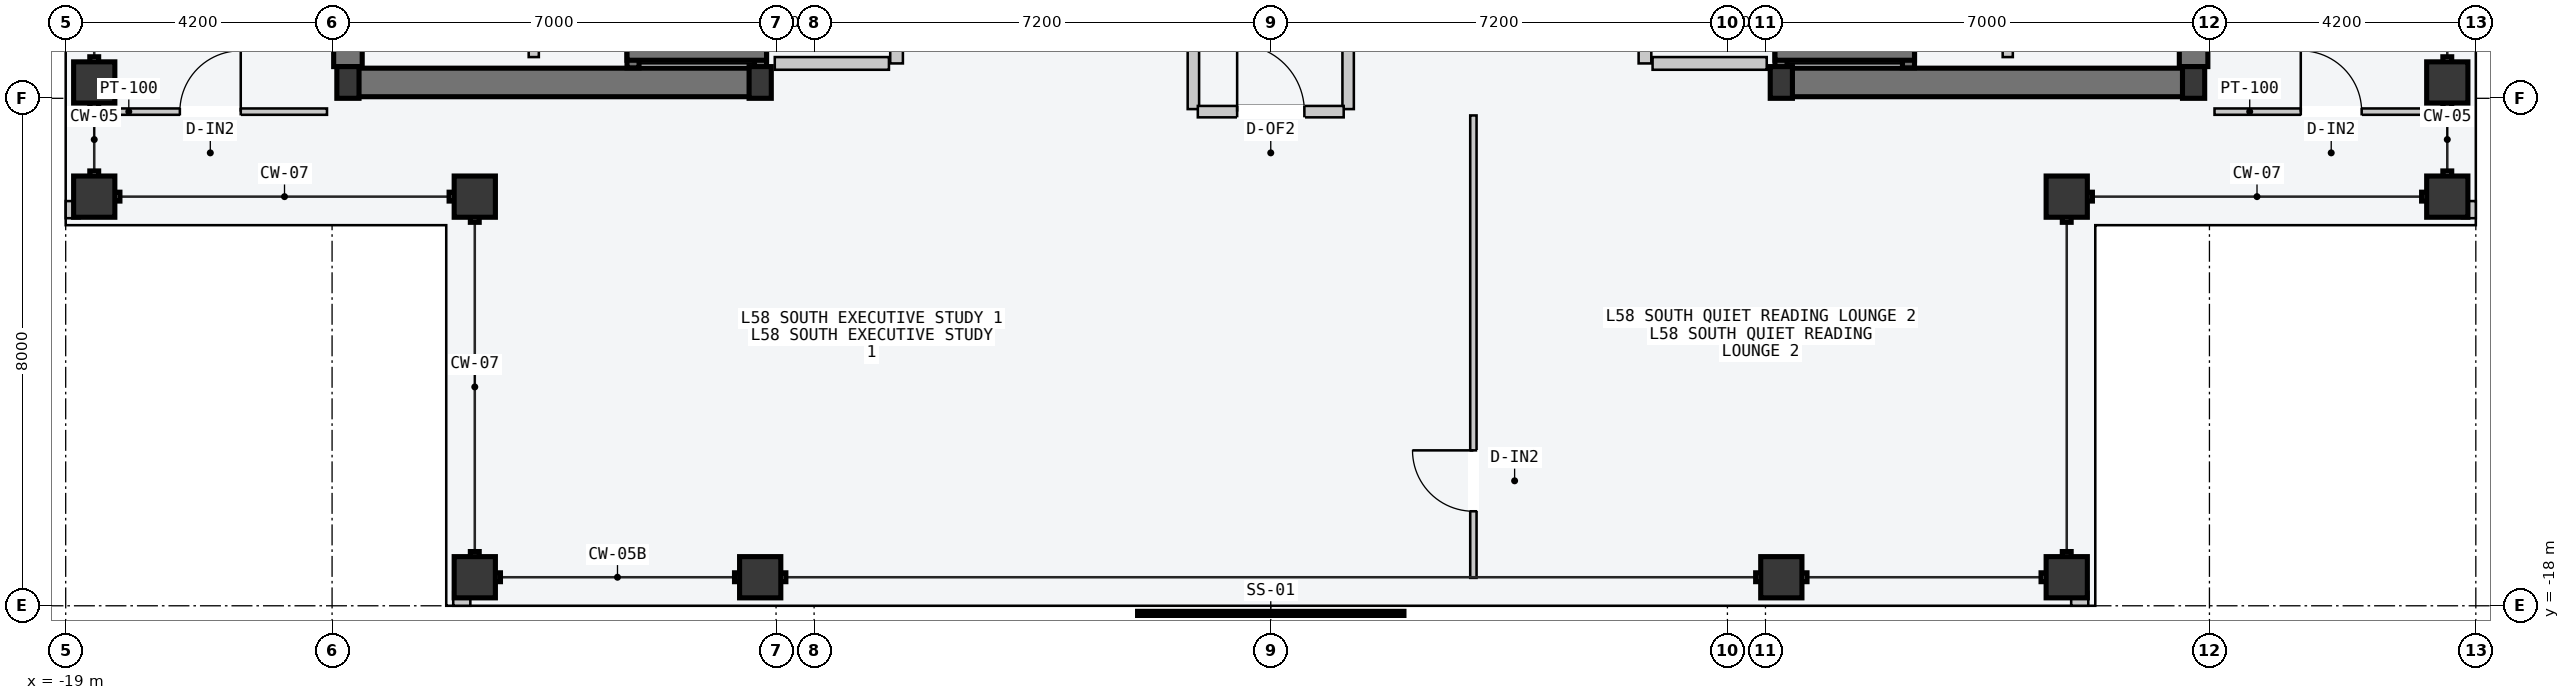
"""IFC4 building model, lengths in metres.
Left out: names, types, materials, properties, quantities, classifications, styles, units other than length and angle.
Written with IfcOpenShell. Run it as: python <this file> out.ifc"""

import sys

from ifc_helpers import new_model, si_unit, direction, frame, frame_2d, origin, origin_2d, place, context, subcontext, project, spatial, rectangle, hollow_rectangle, i_section, extrude, element, fill, save


model = new_model("IFC4")
c1 = context("Model", 3, precision=1e-05, world=origin(), true_north=direction((0.0, 1.0)))
c2 = subcontext(c1, "Body", "Model", "MODEL_VIEW")
j1 = project(units=[si_unit("LENGTHUNIT", "METRE"), si_unit("PLANEANGLEUNIT", "RADIAN")], contexts=[c1])
p1 = place(None, origin())
s1 = spatial("IfcSite", under=j1, at=p1, CompositionType="ELEMENT")
p2 = place(p1, origin())
s2 = spatial("IfcBuilding", under=s1, at=p2, CompositionType="ELEMENT")
p3 = place(p2, frame((0.0, 0.0, 222.0)))
s3 = spatial("IfcBuildingStorey", under=s2, at=p3, CompositionType="ELEMENT", Elevation=222.0)
p4 = place(p3, frame((-14.53, -9.75, -0.2), z_axis=(0.0, 0.0, 1.0), x_axis=(1.0, 0.0, 0.0)))
e1 = element("IfcWall", 1, at=p4, inside=s3, PredefinedType="SHEAR", context=c2, shape_type="SweptSolid", body=[
    extrude(rectangle(XDim=6.46, YDim=0.45, at=frame_2d((3.23, 0.0))), origin(), (0.0, 0.0, 1.0), 3.6),
])
p5 = place(p3, frame((-14.55, -9.5, -0.2), z_axis=(0.0, 0.0, 1.0), x_axis=(0.0, 1.0, 0.0)))
e2 = element("IfcWall", 2, at=p5, inside=s3, PredefinedType="SHEAR", context=c2, shape_type="SweptSolid", body=[
    extrude(rectangle(XDim=9.25, YDim=0.45, at=frame_2d((4.625, 0.0))), origin(), (0.0, 0.0, 1.0), 3.6),
])
p6 = place(p3, frame((8.07, -9.75, -0.2), z_axis=(0.0, 0.0, 1.0), x_axis=(1.0, 0.0, 0.0)))
e3 = element("IfcWall", 3, at=p6, inside=s3, PredefinedType="SHEAR", context=c2, shape_type="SweptSolid", body=[
    extrude(rectangle(XDim=6.46, YDim=0.45, at=frame_2d((3.23, 0.0))), origin(), (0.0, 0.0, 1.0), 3.6),
])
p7 = place(p3, frame((14.55, -9.5, -0.2), z_axis=(0.0, 0.0, 1.0), x_axis=(0.0, 1.0, 0.0)))
e4 = element("IfcWall", 4, at=p7, inside=s3, PredefinedType="SHEAR", context=c2, shape_type="SweptSolid", body=[
    extrude(rectangle(XDim=9.25, YDim=0.45, at=frame_2d((4.625, 0.0))), origin(), (0.0, 0.0, 1.0), 3.6),
])
for number, where, z_axis, x_axis in (
    (5, (-14.55, -9.75, 0.0), (0.0, 0.0, 1.0), (1.0, 0.0, 0.0)),
    (6, (-8.05, -9.75, 0.0), (0.0, 0.0, 1.0), (1.0, 0.0, 0.0)),
    (7, (8.05, -9.75, 0.0), (0.0, 0.0, 1.0), (1.0, 0.0, 0.0)),
    (8, (14.55, -9.75, 0.0), (0.0, 0.0, 1.0), (1.0, 0.0, 0.0)),
):
    element("IfcColumn", number, at=place(p3, frame(where, z_axis=z_axis, x_axis=x_axis)), inside=s3, PredefinedType="COLUMN", context=c2, shape_type="SweptSolid", body=[
        extrude(i_section(OverallWidth=0.35, OverallDepth=0.5, WebThickness=0.02, FlangeThickness=0.032, at=origin_2d()), origin(), (0.0, 0.0, 1.0), 3.6),
    ])
for number, where, z_axis, x_axis in (
    (9, (-12.55, -17.55, 0.0), (0.0, 0.0, 1.0), (1.0, 0.0, 0.0)),
    (10, (-8.05, -17.55, 0.0), (0.0, 0.0, 1.0), (1.0, 0.0, 0.0)),
    (11, (8.05, -17.55, 0.0), (0.0, 0.0, 1.0), (1.0, 0.0, 0.0)),
    (12, (12.55, -17.55, 0.0), (0.0, 0.0, 1.0), (1.0, 0.0, 0.0)),
    (13, (-18.55, -11.55, 0.0), (0.0, 0.0, 1.0), (0.0, 1.0, 0.0)),
    (14, (-18.55, -9.75, 0.0), (0.0, 0.0, 1.0), (0.0, 1.0, 0.0)),
    (15, (18.55, -11.55, 0.0), (0.0, 0.0, 1.0), (0.0, 1.0, 0.0)),
    (16, (18.55, -9.75, 0.0), (0.0, 0.0, 1.0), (0.0, 1.0, 0.0)),
    (17, (12.55, -11.55, 0.0), (0.0, 0.0, 1.0), (1.0, 0.0, 0.0)),
    (18, (-12.55, -11.55, 0.0), (0.0, 0.0, 1.0), (1.0, 0.0, 0.0)),
):
    element("IfcColumn", number, at=place(p3, frame(where, z_axis=z_axis, x_axis=x_axis)), inside=s3, PredefinedType="COLUMN", context=c2, shape_type="SweptSolid", body=[
        extrude(hollow_rectangle(XDim=0.65, YDim=0.65, WallThickness=0.028, at=origin_2d()), origin(), (0.0, 0.0, 1.0), 3.6),
    ])
for number, where, z_axis, x_axis in (
    (19, (-12.89, -17.89, 0.0), (0.0, 0.0, 1.0), (1.0, 0.0, 0.0)),
    (20, (-18.89, -11.89, 0.0), (0.0, 0.0, 1.0), (0.0, 1.0, 0.0)),
    (21, (12.62, -17.89, 0.0), (0.0, 0.0, 1.0), (1.0, 0.0, 0.0)),
    (22, (18.89, -11.89, 0.0), (0.0, 0.0, 1.0), (0.0, 1.0, 0.0)),
):
    element("IfcWall", number, at=place(p3, frame(where, z_axis=z_axis, x_axis=x_axis)), inside=s3, PredefinedType="PARAPET", context=c2, shape_type="SweptSolid", body=[
        extrude(rectangle(XDim=0.27, YDim=0.22, at=frame_2d((0.135, 0.0))), origin(), (0.0, 0.0, 1.0), 1.2),
    ])
p8 = place(p3, frame((-8.045, -9.52, -0.2), z_axis=(0.0, 0.0, 1.0), x_axis=(0.0, 1.0, 0.0)))
e23 = element("IfcWall", 23, at=p8, inside=s3, PredefinedType="SOLIDWALL", context=c2, shape_type="SweptSolid", body=[
    extrude(rectangle(XDim=2.12, YDim=0.19, at=frame_2d((1.06, 0.0))), origin(), (0.0, 0.0, 1.0), 3.6),
])
p9 = place(p8, frame((0.57, 0.0, 0.2)))
e24 = element("IfcOpeningElement", 24, at=p9, cuts=e23, PredefinedType="OPENING", context=c2, shape_type="SweptSolid", body=[
    extrude(rectangle(XDim=1.1, YDim=2.2, at=frame_2d((0.55, 1.1))), frame((0.0, 0.105, 0.0), z_axis=(0.0, -1.0, 0.0), x_axis=(1.0, 0.0, 0.0)), (0.0, 0.0, 1.0), 0.21),
])
p10 = place(p3, frame((-10.055, -9.52, -0.2), z_axis=(0.0, 0.0, 1.0), x_axis=(0.0, 1.0, 0.0)))
e25 = element("IfcWall", 25, at=p10, inside=s3, PredefinedType="SOLIDWALL", context=c2, shape_type="SweptSolid", body=[
    extrude(rectangle(XDim=2.12, YDim=0.19, at=frame_2d((1.06, 0.0))), origin(), (0.0, 0.0, 1.0), 3.6),
])
p11 = place(p3, frame((-10.15, -9.305, -0.2), z_axis=(0.0, 0.0, 1.0), x_axis=(1.0, 0.0, 0.0)))
e26 = element("IfcWall", 26, at=p11, inside=s3, PredefinedType="SOLIDWALL", context=c2, shape_type="SweptSolid", body=[
    extrude(rectangle(XDim=2.2, YDim=0.19, at=frame_2d((1.1, 0.0))), origin(), (0.0, 0.0, 1.0), 3.6),
])
p12 = place(p3, frame((8.045, -9.52, -0.2), z_axis=(0.0, 0.0, 1.0), x_axis=(0.0, 1.0, 0.0)))
e27 = element("IfcWall", 27, at=p12, inside=s3, PredefinedType="SOLIDWALL", context=c2, shape_type="SweptSolid", body=[
    extrude(rectangle(XDim=2.12, YDim=0.19, at=frame_2d((1.06, 0.0))), origin(), (0.0, 0.0, 1.0), 3.6),
])
p13 = place(p12, frame((0.57, 0.0, 0.2)))
e28 = element("IfcOpeningElement", 28, at=p13, cuts=e27, PredefinedType="OPENING", context=c2, shape_type="SweptSolid", body=[
    extrude(rectangle(XDim=1.1, YDim=2.2, at=frame_2d((0.55, 1.1))), frame((0.0, 0.105, 0.0), z_axis=(0.0, -1.0, 0.0), x_axis=(1.0, 0.0, 0.0)), (0.0, 0.0, 1.0), 0.21),
])
p14 = place(p3, frame((10.055, -9.52, -0.2), z_axis=(0.0, 0.0, 1.0), x_axis=(0.0, 1.0, 0.0)))
e29 = element("IfcWall", 29, at=p14, inside=s3, PredefinedType="SOLIDWALL", context=c2, shape_type="SweptSolid", body=[
    extrude(rectangle(XDim=2.12, YDim=0.19, at=frame_2d((1.06, 0.0))), origin(), (0.0, 0.0, 1.0), 3.6),
])
p15 = place(p3, frame((7.95, -9.305, -0.2), z_axis=(0.0, 0.0, 1.0), x_axis=(1.0, 0.0, 0.0)))
e30 = element("IfcWall", 30, at=p15, inside=s3, PredefinedType="SOLIDWALL", context=c2, shape_type="SweptSolid", body=[
    extrude(rectangle(XDim=2.2, YDim=0.19, at=frame_2d((1.1, 0.0))), origin(), (0.0, 0.0, 1.0), 3.6),
])
p16 = place(p3, frame((-5.9, -9.45, 0.0), z_axis=(0.0, 0.0, 1.0), x_axis=(0.0, 1.0, 0.0)))
e31 = element("IfcWall", 31, at=p16, inside=s3, PredefinedType="PARTITIONING", context=c2, shape_type="SweptSolid", body=[
    extrude(rectangle(XDim=10.5, YDim=0.2, at=frame_2d((5.25, 0.0))), origin(), (0.0, 0.0, 1.0), 3.4),
])
p17 = place(p16, frame((3.9, 0.0, 0.0)))
e32 = element("IfcOpeningElement", 32, at=p17, cuts=e31, PredefinedType="OPENING", context=c2, shape_type="SweptSolid", body=[
    extrude(rectangle(XDim=1.5, YDim=2.2, at=frame_2d((0.75, 1.1))), frame((0.0, 0.11, 0.0), z_axis=(0.0, -1.0, 0.0), x_axis=(1.0, 0.0, 0.0)), (0.0, 0.0, 1.0), 0.22),
])
p18 = place(p3, frame((-6.02, -9.45, 0.0), z_axis=(0.0, 0.0, 1.0), x_axis=(-1.0, 0.0, 0.0)))
e33 = element("IfcWall", 33, at=p18, inside=s3, PredefinedType="PARTITIONING", context=c2, shape_type="SweptSolid", body=[
    extrude(rectangle(XDim=1.8, YDim=0.2, at=frame_2d((0.9, 0.0))), origin(), (0.0, 0.0, 1.0), 3.4),
])
p19 = place(p3, frame((-11.62, -9.35, 0.0), z_axis=(0.0, 0.0, 1.0), x_axis=(0.0, 1.0, 0.0)))
e34 = element("IfcWall", 34, at=p19, inside=s3, PredefinedType="PARTITIONING", context=c2, shape_type="SweptSolid", body=[
    extrude(rectangle(XDim=3.85, YDim=0.16, at=frame_2d((1.925, 0.0))), origin(), (0.0, 0.0, 1.0), 3.4),
])
p20 = place(p19, frame((1.475, 0.0, 0.0)))
e35 = element("IfcOpeningElement", 35, at=p20, cuts=e34, PredefinedType="OPENING", context=c2, shape_type="SweptSolid", body=[
    extrude(rectangle(XDim=0.9, YDim=2.15, at=frame_2d((0.45, 1.075))), frame((0.0, 0.09, 0.0), z_axis=(0.0, -1.0, 0.0), x_axis=(1.0, 0.0, 0.0)), (0.0, 0.0, 1.0), 0.18),
])
p21 = place(p3, frame((5.9, -9.45, 0.0), z_axis=(0.0, 0.0, 1.0), x_axis=(0.0, 1.0, 0.0)))
e36 = element("IfcWall", 36, at=p21, inside=s3, PredefinedType="PARTITIONING", context=c2, shape_type="SweptSolid", body=[
    extrude(rectangle(XDim=10.5, YDim=0.2, at=frame_2d((5.25, 0.0))), origin(), (0.0, 0.0, 1.0), 3.4),
])
p22 = place(p21, frame((3.9, 0.0, 0.0)))
e37 = element("IfcOpeningElement", 37, at=p22, cuts=e36, PredefinedType="OPENING", context=c2, shape_type="SweptSolid", body=[
    extrude(rectangle(XDim=1.5, YDim=2.2, at=frame_2d((0.75, 1.1))), frame((0.0, 0.11, 0.0), z_axis=(0.0, -1.0, 0.0), x_axis=(1.0, 0.0, 0.0)), (0.0, 0.0, 1.0), 0.22),
])
p23 = place(p3, frame((6.02, -9.45, 0.0), z_axis=(0.0, 0.0, 1.0), x_axis=(1.0, 0.0, 0.0)))
e38 = element("IfcWall", 38, at=p23, inside=s3, PredefinedType="PARTITIONING", context=c2, shape_type="SweptSolid", body=[
    extrude(rectangle(XDim=1.8, YDim=0.2, at=frame_2d((0.9, 0.0))), origin(), (0.0, 0.0, 1.0), 3.4),
])
p24 = place(p3, frame((11.62, -9.35, 0.0), z_axis=(0.0, 0.0, 1.0), x_axis=(0.0, 1.0, 0.0)))
e39 = element("IfcWall", 39, at=p24, inside=s3, PredefinedType="PARTITIONING", context=c2, shape_type="SweptSolid", body=[
    extrude(rectangle(XDim=3.85, YDim=0.16, at=frame_2d((1.925, 0.0))), origin(), (0.0, 0.0, 1.0), 3.4),
])
p25 = place(p24, frame((1.475, 0.0, 0.0)))
e40 = element("IfcOpeningElement", 40, at=p25, cuts=e39, PredefinedType="OPENING", context=c2, shape_type="SweptSolid", body=[
    extrude(rectangle(XDim=0.9, YDim=2.15, at=frame_2d((0.45, 1.075))), frame((0.0, 0.09, 0.0), z_axis=(0.0, -1.0, 0.0), x_axis=(1.0, 0.0, 0.0)), (0.0, 0.0, 1.0), 0.18),
])
p26 = place(p3, frame((-1.22, -10.17, 0.0), z_axis=(0.0, 0.0, 1.0), x_axis=(0.0, 1.0, 0.0)))
e41 = element("IfcWall", 41, at=p26, inside=s3, PredefinedType="PARTITIONING", context=c2, shape_type="SweptSolid", body=[
    extrude(rectangle(XDim=4.49, YDim=0.18, at=frame_2d((2.245, 0.0))), origin(), (0.0, 0.0, 1.0), 3.4),
])
p27 = place(p26, frame((1.15, 0.0, 0.0)))
e42 = element("IfcOpeningElement", 42, at=p27, cuts=e41, PredefinedType="OPENING", context=c2, shape_type="SweptSolid", body=[
    extrude(rectangle(XDim=0.96, YDim=2.18, at=frame_2d((0.48, 1.09))), frame((0.0, 0.1, 0.0), z_axis=(0.0, -1.0, 0.0), x_axis=(1.0, 0.0, 0.0)), (0.0, 0.0, 1.0), 0.2),
])
p28 = place(p3, frame((1.22, -10.17, 0.0), z_axis=(0.0, 0.0, 1.0), x_axis=(0.0, 1.0, 0.0)))
e43 = element("IfcWall", 43, at=p28, inside=s3, PredefinedType="PARTITIONING", context=c2, shape_type="SweptSolid", body=[
    extrude(rectangle(XDim=4.49, YDim=0.18, at=frame_2d((2.245, 0.0))), origin(), (0.0, 0.0, 1.0), 3.4),
])
p29 = place(p28, frame((1.15, 0.0, 0.0)))
e44 = element("IfcOpeningElement", 44, at=p29, cuts=e43, PredefinedType="OPENING", context=c2, shape_type="SweptSolid", body=[
    extrude(rectangle(XDim=0.96, YDim=2.18, at=frame_2d((0.48, 1.09))), frame((0.0, 0.1, 0.0), z_axis=(0.0, -1.0, 0.0), x_axis=(1.0, 0.0, 0.0)), (0.0, 0.0, 1.0), 0.2),
])
p30 = place(p3, frame((3.195, -17.56, 0.0), z_axis=(0.0, 0.0, 1.0), x_axis=(0.0, 1.0, 0.0)))
e45 = element("IfcWall", 45, at=p30, inside=s3, PredefinedType="PARTITIONING", context=c2, shape_type="SweptSolid", body=[
    extrude(rectangle(XDim=7.29, YDim=0.1, at=frame_2d((3.645, 0.0))), origin(), (0.0, 0.0, 1.0), 3.4),
])
p31 = place(p30, frame((1.05, 0.0, 0.0)))
e46 = element("IfcOpeningElement", 46, at=p31, cuts=e45, PredefinedType="OPENING", context=c2, shape_type="SweptSolid", body=[
    extrude(rectangle(XDim=0.96, YDim=2.18, at=frame_2d((0.48, 1.09))), frame((0.0, 0.06, 0.0), z_axis=(0.0, -1.0, 0.0), x_axis=(1.0, 0.0, 0.0)), (0.0, 0.0, 1.0), 0.12),
])
p32 = place(p3, frame((-1.15, -10.21, 0.0), z_axis=(0.0, 0.0, 1.0), x_axis=(1.0, 0.0, 0.0)))
e47 = element("IfcWall", 47, at=p32, inside=s3, PredefinedType="PARTITIONING", context=c2, shape_type="SweptSolid", body=[
    extrude(rectangle(XDim=2.3, YDim=0.18, at=frame_2d((1.15, 0.0))), origin(), (0.0, 0.0, 1.0), 3.4),
])
p33 = place(p32, frame((0.62, 0.0, 0.0)))
e48 = element("IfcOpeningElement", 48, at=p33, cuts=e47, PredefinedType="OPENING", context=c2, shape_type="SweptSolid", body=[
    extrude(rectangle(XDim=1.06, YDim=2.2, at=frame_2d((0.53, 1.1))), frame((0.0, 0.1, 0.0), z_axis=(0.0, -1.0, 0.0), x_axis=(1.0, 0.0, 0.0)), (0.0, 0.0, 1.0), 0.2),
])
p34 = place(p3, frame((-18.56, -10.21, 0.0), z_axis=(0.0, 0.0, 1.0), x_axis=(1.0, 0.0, 0.0)))
e49 = element("IfcWall", 49, at=p34, inside=s3, PredefinedType="PARTITIONING", context=c2, shape_type="SweptSolid", body=[
    extrude(rectangle(XDim=3.68, YDim=0.1, at=frame_2d((1.84, 0.0))), origin(), (0.0, 0.0, 1.0), 3.4),
])
p35 = place(p34, frame((1.36, 0.0, 0.0)))
e50 = element("IfcOpeningElement", 50, at=p35, cuts=e49, PredefinedType="OPENING", context=c2, shape_type="SweptSolid", body=[
    extrude(rectangle(XDim=0.96, YDim=2.18, at=frame_2d((0.48, 1.09))), frame((0.0, 0.06, 0.0), z_axis=(0.0, -1.0, 0.0), x_axis=(1.0, 0.0, 0.0)), (0.0, 0.0, 1.0), 0.12),
])
p36 = place(p3, frame((14.88, -10.21, 0.0), z_axis=(0.0, 0.0, 1.0), x_axis=(1.0, 0.0, 0.0)))
e51 = element("IfcWall", 51, at=p36, inside=s3, PredefinedType="PARTITIONING", context=c2, shape_type="SweptSolid", body=[
    extrude(rectangle(XDim=3.68, YDim=0.1, at=frame_2d((1.84, 0.0))), origin(), (0.0, 0.0, 1.0), 3.4),
])
p37 = place(p36, frame((1.36, 0.0, 0.0)))
e52 = element("IfcOpeningElement", 52, at=p37, cuts=e51, PredefinedType="OPENING", context=c2, shape_type="SweptSolid", body=[
    extrude(rectangle(XDim=0.96, YDim=2.18, at=frame_2d((0.48, 1.09))), frame((0.0, 0.06, 0.0), z_axis=(0.0, -1.0, 0.0), x_axis=(1.0, 0.0, 0.0)), (0.0, 0.0, 1.0), 0.12),
])
p38 = place(p31, origin())
e53 = element("IfcDoor", 53, at=p38, inside=s3, OperationType="SINGLE_SWING_RIGHT", PredefinedType="DOOR", context=c2, shape_type="SweptSolid", body=[
    extrude(rectangle(XDim=0.96, YDim=2.18, at=frame_2d((0.48, 1.09))), frame((0.0, 0.025, 0.0), z_axis=(0.0, -1.0, 0.0), x_axis=(1.0, 0.0, 0.0)), (0.0, 0.0, 1.0), 0.05),
])
fill(e46, e53)
p39 = place(p33, origin())
e54 = element("IfcDoor", 54, at=p39, inside=s3, OperationType="SINGLE_SWING_LEFT", PredefinedType="DOOR", context=c2, shape_type="SweptSolid", body=[
    extrude(rectangle(XDim=1.06, YDim=2.2, at=frame_2d((0.53, 1.1))), frame((0.0, 0.025, 0.0), z_axis=(0.0, -1.0, 0.0), x_axis=(1.0, 0.0, 0.0)), (0.0, 0.0, 1.0), 0.05),
])
fill(e48, e54)
p40 = place(p35, origin())
e55 = element("IfcDoor", 55, at=p40, inside=s3, OperationType="SINGLE_SWING_RIGHT", PredefinedType="DOOR", context=c2, shape_type="SweptSolid", body=[
    extrude(rectangle(XDim=0.96, YDim=2.18, at=frame_2d((0.48, 1.09))), frame((0.0, 0.025, 0.0), z_axis=(0.0, -1.0, 0.0), x_axis=(1.0, 0.0, 0.0)), (0.0, 0.0, 1.0), 0.05),
])
fill(e50, e55)
p41 = place(p37, origin())
e56 = element("IfcDoor", 56, at=p41, inside=s3, OperationType="SINGLE_SWING_LEFT", PredefinedType="DOOR", context=c2, shape_type="SweptSolid", body=[
    extrude(rectangle(XDim=0.96, YDim=2.18, at=frame_2d((0.48, 1.09))), frame((0.0, 0.025, 0.0), z_axis=(0.0, -1.0, 0.0), x_axis=(1.0, 0.0, 0.0)), (0.0, 0.0, 1.0), 0.05),
])
fill(e52, e56)
save(model, sys.argv[1])
